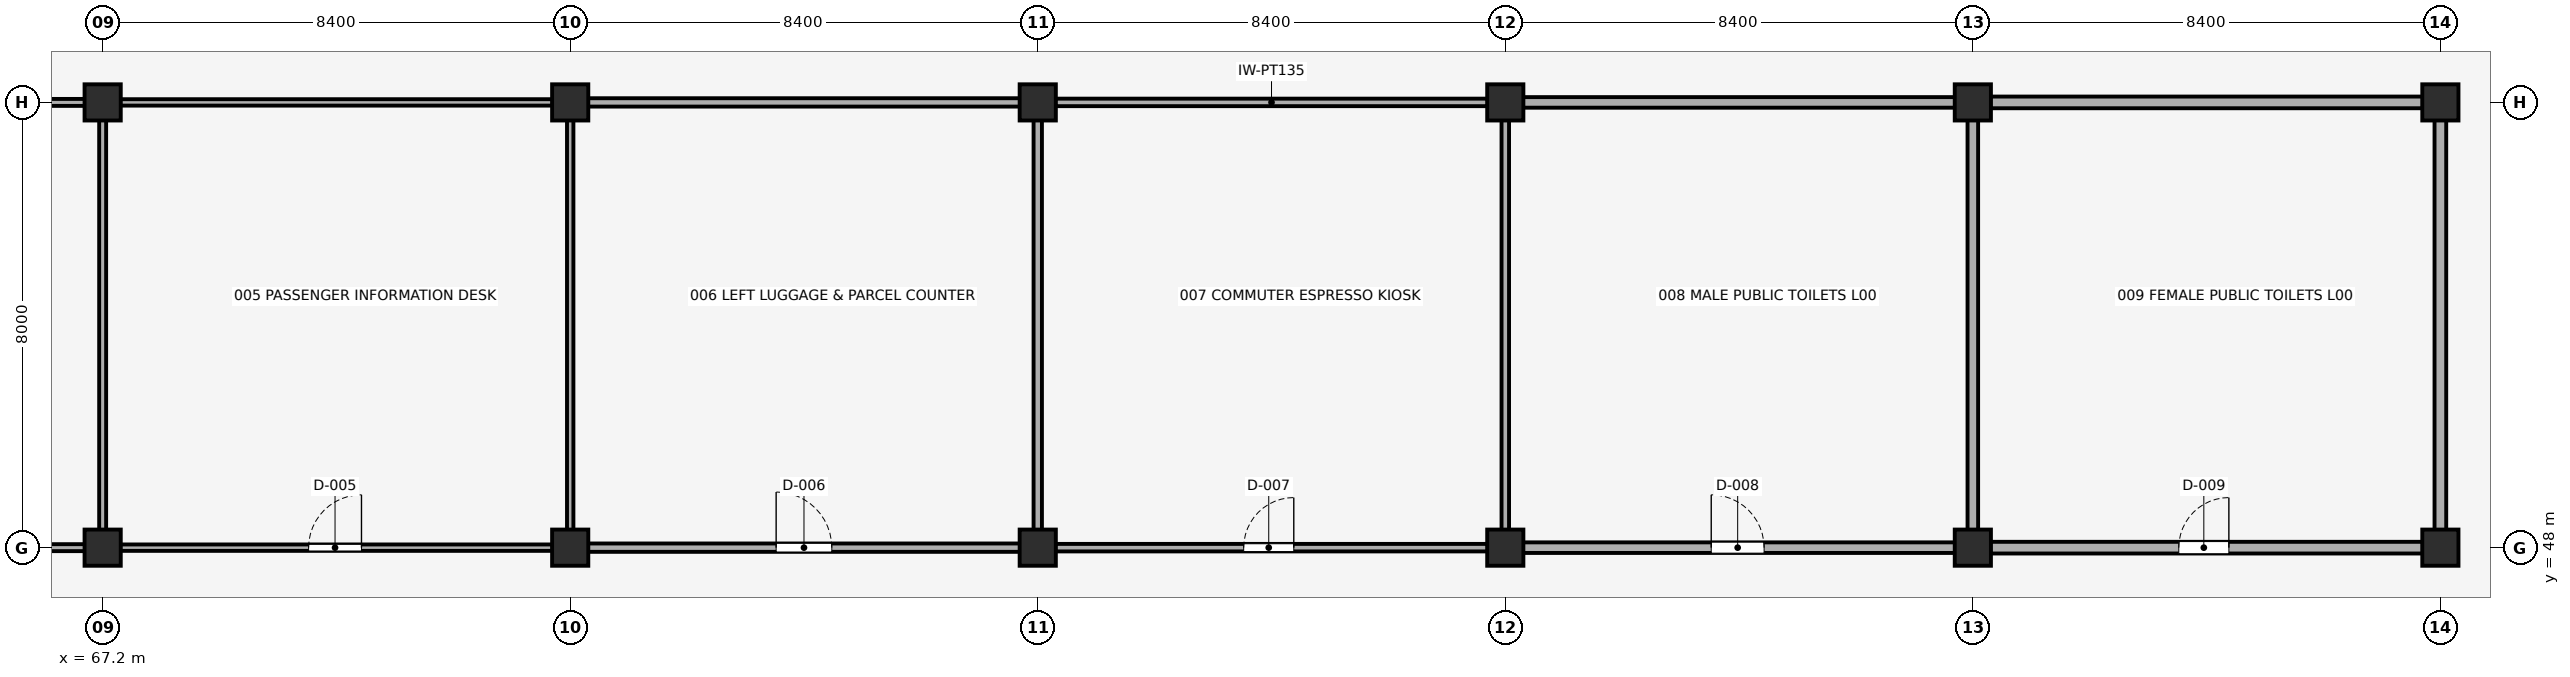
"""IFC4 building model, lengths in metres.
Left out: names, types, materials, properties, quantities, classifications, styles, units other than length and angle.
Written with IfcOpenShell. Run it as: python <this file> out.ifc"""

import sys

from ifc_helpers import new_model, si_unit, direction, frame, frame_2d, origin, origin_2d, place, context, subcontext, project, spatial, rectangle, circle, extrude, element, fill, save


model = new_model("IFC4")
c1 = context("Model", 3, precision=1e-05, world=origin(), true_north=direction((0.0, 1.0)))
c2 = subcontext(c1, "Body", "Model", "MODEL_VIEW")
j1 = project(units=[si_unit("LENGTHUNIT", "METRE"), si_unit("PLANEANGLEUNIT", "RADIAN")], contexts=[c1])
p1 = place(None, origin())
s1 = spatial("IfcSite", under=j1, at=p1, CompositionType="ELEMENT")
p2 = place(p1, origin())
s2 = spatial("IfcBuilding", under=s1, at=p2, CompositionType="ELEMENT")
p3 = place(p2, origin())
s3 = spatial("IfcBuildingStorey", under=s2, at=p3, CompositionType="ELEMENT", Elevation=0.0)
for number, where, z_axis, x_axis in (
    (1, (67.2, 48.0, 0.0), (0.0, 0.0, 1.0), (1.0, 0.0, 0.0)),
    (2, (67.2, 56.0, 0.0), (0.0, 0.0, 1.0), (1.0, 0.0, 0.0)),
    (3, (75.6, 48.0, 0.0), (0.0, 0.0, 1.0), (1.0, 0.0, 0.0)),
    (4, (75.6, 56.0, 0.0), (0.0, 0.0, 1.0), (1.0, 0.0, 0.0)),
    (5, (84.0, 48.0, 0.0), (0.0, 0.0, 1.0), (1.0, 0.0, 0.0)),
    (6, (84.0, 56.0, 0.0), (0.0, 0.0, 1.0), (1.0, 0.0, 0.0)),
    (7, (92.4, 48.0, 0.0), (0.0, 0.0, 1.0), (1.0, 0.0, 0.0)),
    (8, (92.4, 56.0, 0.0), (0.0, 0.0, 1.0), (1.0, 0.0, 0.0)),
    (9, (100.8, 48.0, 0.0), (0.0, 0.0, 1.0), (1.0, 0.0, 0.0)),
    (10, (100.8, 56.0, 0.0), (0.0, 0.0, 1.0), (1.0, 0.0, 0.0)),
    (11, (109.2, 48.0, 0.0), (0.0, 0.0, 1.0), (1.0, 0.0, 0.0)),
    (12, (109.2, 56.0, 0.0), (0.0, 0.0, 1.0), (1.0, 0.0, 0.0)),
):
    element("IfcColumn", number, at=place(p3, frame(where, z_axis=z_axis, x_axis=x_axis)), inside=s3, PredefinedType="COLUMN", context=c2, shape_type="SweptSolid", body=[
        extrude(circle(Radius=0.325, at=origin_2d()), origin(), (0.0, 0.0, 1.0), 5.15),
    ])
p4 = place(p3, frame((67.515, 48.0, 0.0), z_axis=(0.0, 0.0, 1.0), x_axis=(1.0, 0.0, 0.0)))
e13 = element("IfcWall", 13, at=p4, inside=s3, PredefinedType="PARTITIONING", context=c2, shape_type="SweptSolid", body=[
    extrude(rectangle(XDim=7.77, YDim=0.115, at=frame_2d((3.885, 0.0))), origin(), (0.0, 0.0, 1.0), 4.605),
])
p5 = place(p4, frame((3.385, 0.0, 0.0), z_axis=(0.0, 0.0, 1.0), x_axis=(1.0, 0.0, 0.0)))
e14 = element("IfcOpeningElement", 14, at=p5, cuts=e13, PredefinedType="OPENING", context=c2, shape_type="SweptSolid", body=[
    extrude(rectangle(XDim=0.95, YDim=2.15, at=frame_2d((0.475, 1.075))), frame((0.0, 0.067, 0.0), z_axis=(0.0, -1.0, 0.0), x_axis=(1.0, 0.0, 0.0)), (0.0, 0.0, 1.0), 0.135),
])
p6 = place(p3, frame((75.915, 48.0, 0.0), z_axis=(0.0, 0.0, 1.0), x_axis=(1.0, 0.0, 0.0)))
e15 = element("IfcWall", 15, at=p6, inside=s3, PredefinedType="PARTITIONING", context=c2, shape_type="SweptSolid", body=[
    extrude(rectangle(XDim=7.77, YDim=0.15, at=frame_2d((3.885, 0.0))), origin(), (0.0, 0.0, 1.0), 4.605),
])
p7 = place(p6, frame((3.385, 0.0, 0.0), z_axis=(0.0, 0.0, 1.0), x_axis=(1.0, 0.0, 0.0)))
e16 = element("IfcOpeningElement", 16, at=p7, cuts=e15, PredefinedType="OPENING", context=c2, shape_type="SweptSolid", body=[
    extrude(rectangle(XDim=1.0, YDim=2.15, at=frame_2d((0.5, 1.075))), frame((0.0, 0.085, 0.0), z_axis=(0.0, -1.0, 0.0), x_axis=(1.0, 0.0, 0.0)), (0.0, 0.0, 1.0), 0.17),
])
p8 = place(p3, frame((84.315, 48.0, 0.0), z_axis=(0.0, 0.0, 1.0), x_axis=(1.0, 0.0, 0.0)))
e17 = element("IfcWall", 17, at=p8, inside=s3, PredefinedType="PARTITIONING", context=c2, shape_type="SweptSolid", body=[
    extrude(rectangle(XDim=7.77, YDim=0.135, at=frame_2d((3.885, 0.0))), origin(), (0.0, 0.0, 1.0), 4.605),
])
p9 = place(p8, frame((3.385, 0.0, 0.0), z_axis=(0.0, 0.0, 1.0), x_axis=(1.0, 0.0, 0.0)))
e18 = element("IfcOpeningElement", 18, at=p9, cuts=e17, PredefinedType="OPENING", context=c2, shape_type="SweptSolid", body=[
    extrude(rectangle(XDim=0.9, YDim=2.1, at=frame_2d((0.45, 1.05))), frame((0.0, 0.077, 0.0), z_axis=(0.0, -1.0, 0.0), x_axis=(1.0, 0.0, 0.0)), (0.0, 0.0, 1.0), 0.155),
])
p10 = place(p3, frame((92.715, 48.0, 0.0), z_axis=(0.0, 0.0, 1.0), x_axis=(1.0, 0.0, 0.0)))
e19 = element("IfcWall", 19, at=p10, inside=s3, PredefinedType="PLUMBINGWALL", context=c2, shape_type="SweptSolid", body=[
    extrude(rectangle(XDim=7.77, YDim=0.19, at=frame_2d((3.885, 0.0))), origin(), (0.0, 0.0, 1.0), 4.605),
])
p11 = place(p10, frame((3.385, 0.0, 0.0), z_axis=(0.0, 0.0, 1.0), x_axis=(1.0, 0.0, 0.0)))
e20 = element("IfcOpeningElement", 20, at=p11, cuts=e19, PredefinedType="OPENING", context=c2, shape_type="SweptSolid", body=[
    extrude(rectangle(XDim=0.95, YDim=2.15, at=frame_2d((0.475, 1.075))), frame((0.0, 0.105, 0.0), z_axis=(0.0, -1.0, 0.0), x_axis=(1.0, 0.0, 0.0)), (0.0, 0.0, 1.0), 0.21),
])
p12 = place(p3, frame((101.115, 48.0, 0.0), z_axis=(0.0, 0.0, 1.0), x_axis=(1.0, 0.0, 0.0)))
e21 = element("IfcWall", 21, at=p12, inside=s3, PredefinedType="PLUMBINGWALL", context=c2, shape_type="SweptSolid", body=[
    extrude(rectangle(XDim=7.77, YDim=0.21, at=frame_2d((3.885, 0.0))), origin(), (0.0, 0.0, 1.0), 4.605),
])
p13 = place(p12, frame((3.385, 0.0, 0.0), z_axis=(0.0, 0.0, 1.0), x_axis=(1.0, 0.0, 0.0)))
e22 = element("IfcOpeningElement", 22, at=p13, cuts=e21, PredefinedType="OPENING", context=c2, shape_type="SweptSolid", body=[
    extrude(rectangle(XDim=0.9, YDim=2.15, at=frame_2d((0.45, 1.075))), frame((0.0, 0.115, 0.0), z_axis=(0.0, -1.0, 0.0), x_axis=(1.0, 0.0, 0.0)), (0.0, 0.0, 1.0), 0.23),
])
for number, where, z_axis, x_axis in (
    (23, (59.115, 48.0, 0.0), (0.0, 0.0, 1.0), (1.0, 0.0, 0.0)),
    (24, (59.115, 56.0, 0.0), (0.0, 0.0, 1.0), (1.0, 0.0, 0.0)),
):
    element("IfcWall", number, at=place(p3, frame(where, z_axis=z_axis, x_axis=x_axis)), inside=s3, PredefinedType="PARTITIONING", context=c2, shape_type="SweptSolid", body=[
        extrude(rectangle(XDim=7.77, YDim=0.125, at=frame_2d((3.885, 0.0))), origin(), (0.0, 0.0, 1.0), 4.605),
    ])
p14 = place(p3, frame((67.2, 48.315, 0.0), z_axis=(0.0, 0.0, 1.0), x_axis=(0.0, 1.0, 0.0)))
e25 = element("IfcWall", 25, at=p14, inside=s3, PredefinedType="PARTITIONING", context=c2, shape_type="SweptSolid", body=[
    extrude(rectangle(XDim=7.37, YDim=0.125, at=frame_2d((3.685, 0.0))), origin(), (0.0, 0.0, 1.0), 4.542),
])
p15 = place(p3, frame((67.515, 56.0, 0.0), z_axis=(0.0, 0.0, 1.0), x_axis=(1.0, 0.0, 0.0)))
e26 = element("IfcWall", 26, at=p15, inside=s3, PredefinedType="PARTITIONING", context=c2, shape_type="SweptSolid", body=[
    extrude(rectangle(XDim=7.77, YDim=0.115, at=frame_2d((3.885, 0.0))), origin(), (0.0, 0.0, 1.0), 4.605),
])
p16 = place(p3, frame((75.6, 48.315, 0.0), z_axis=(0.0, 0.0, 1.0), x_axis=(0.0, 1.0, 0.0)))
e27 = element("IfcWall", 27, at=p16, inside=s3, PredefinedType="PARTITIONING", context=c2, shape_type="SweptSolid", body=[
    extrude(rectangle(XDim=7.37, YDim=0.115, at=frame_2d((3.685, 0.0))), origin(), (0.0, 0.0, 1.0), 4.542),
])
p17 = place(p3, frame((75.915, 56.0, 0.0), z_axis=(0.0, 0.0, 1.0), x_axis=(1.0, 0.0, 0.0)))
e28 = element("IfcWall", 28, at=p17, inside=s3, PredefinedType="PARTITIONING", context=c2, shape_type="SweptSolid", body=[
    extrude(rectangle(XDim=7.77, YDim=0.15, at=frame_2d((3.885, 0.0))), origin(), (0.0, 0.0, 1.0), 4.605),
])
p18 = place(p3, frame((84.0, 48.315, 0.0), z_axis=(0.0, 0.0, 1.0), x_axis=(0.0, 1.0, 0.0)))
e29 = element("IfcWall", 29, at=p18, inside=s3, PredefinedType="PARTITIONING", context=c2, shape_type="SweptSolid", body=[
    extrude(rectangle(XDim=7.37, YDim=0.15, at=frame_2d((3.685, 0.0))), origin(), (0.0, 0.0, 1.0), 4.542),
])
p19 = place(p3, frame((84.315, 56.0, 0.0), z_axis=(0.0, 0.0, 1.0), x_axis=(1.0, 0.0, 0.0)))
e30 = element("IfcWall", 30, at=p19, inside=s3, PredefinedType="PARTITIONING", context=c2, shape_type="SweptSolid", body=[
    extrude(rectangle(XDim=7.77, YDim=0.135, at=frame_2d((3.885, 0.0))), origin(), (0.0, 0.0, 1.0), 4.605),
])
p20 = place(p3, frame((92.4, 48.315, 0.0), z_axis=(0.0, 0.0, 1.0), x_axis=(0.0, 1.0, 0.0)))
e31 = element("IfcWall", 31, at=p20, inside=s3, PredefinedType="PARTITIONING", context=c2, shape_type="SweptSolid", body=[
    extrude(rectangle(XDim=7.37, YDim=0.135, at=frame_2d((3.685, 0.0))), origin(), (0.0, 0.0, 1.0), 4.542),
])
p21 = place(p3, frame((92.715, 56.0, 0.0), z_axis=(0.0, 0.0, 1.0), x_axis=(1.0, 0.0, 0.0)))
e32 = element("IfcWall", 32, at=p21, inside=s3, PredefinedType="PLUMBINGWALL", context=c2, shape_type="SweptSolid", body=[
    extrude(rectangle(XDim=7.77, YDim=0.19, at=frame_2d((3.885, 0.0))), origin(), (0.0, 0.0, 1.0), 4.605),
])
p22 = place(p3, frame((100.8, 48.315, 0.0), z_axis=(0.0, 0.0, 1.0), x_axis=(0.0, 1.0, 0.0)))
e33 = element("IfcWall", 33, at=p22, inside=s3, PredefinedType="PLUMBINGWALL", context=c2, shape_type="SweptSolid", body=[
    extrude(rectangle(XDim=7.37, YDim=0.19, at=frame_2d((3.685, 0.0))), origin(), (0.0, 0.0, 1.0), 4.542),
])
p23 = place(p3, frame((101.115, 56.0, 0.0), z_axis=(0.0, 0.0, 1.0), x_axis=(1.0, 0.0, 0.0)))
e34 = element("IfcWall", 34, at=p23, inside=s3, PredefinedType="PLUMBINGWALL", context=c2, shape_type="SweptSolid", body=[
    extrude(rectangle(XDim=7.77, YDim=0.21, at=frame_2d((3.885, 0.0))), origin(), (0.0, 0.0, 1.0), 4.605),
])
p24 = place(p3, frame((109.2, 48.315, 0.0), z_axis=(0.0, 0.0, 1.0), x_axis=(0.0, 1.0, 0.0)))
e35 = element("IfcWall", 35, at=p24, inside=s3, PredefinedType="PLUMBINGWALL", context=c2, shape_type="SweptSolid", body=[
    extrude(rectangle(XDim=7.37, YDim=0.21, at=frame_2d((3.685, 0.0))), origin(), (0.0, 0.0, 1.0), 4.542),
])
p25 = place(p5, origin())
e36 = element("IfcDoor", 36, at=p25, inside=s3, OperationType="SINGLE_SWING_RIGHT", PredefinedType="DOOR", context=c2, shape_type="SweptSolid", body=[
    extrude(rectangle(XDim=0.95, YDim=2.15, at=frame_2d((0.475, 1.075))), frame((0.0, 0.025, 0.0), z_axis=(0.0, -1.0, 0.0), x_axis=(1.0, 0.0, 0.0)), (0.0, 0.0, 1.0), 0.05),
])
fill(e14, e36)
p26 = place(p7, origin())
e37 = element("IfcDoor", 37, at=p26, inside=s3, OperationType="SINGLE_SWING_LEFT", PredefinedType="DOOR", context=c2, shape_type="SweptSolid", body=[
    extrude(rectangle(XDim=1.0, YDim=2.15, at=frame_2d((0.5, 1.075))), frame((0.0, 0.025, 0.0), z_axis=(0.0, -1.0, 0.0), x_axis=(1.0, 0.0, 0.0)), (0.0, 0.0, 1.0), 0.05),
])
fill(e16, e37)
p27 = place(p9, origin())
e38 = element("IfcDoor", 38, at=p27, inside=s3, OperationType="SINGLE_SWING_RIGHT", PredefinedType="DOOR", context=c2, shape_type="SweptSolid", body=[
    extrude(rectangle(XDim=0.9, YDim=2.1, at=frame_2d((0.45, 1.05))), frame((0.0, 0.025, 0.0), z_axis=(0.0, -1.0, 0.0), x_axis=(1.0, 0.0, 0.0)), (0.0, 0.0, 1.0), 0.05),
])
fill(e18, e38)
p28 = place(p11, origin())
e39 = element("IfcDoor", 39, at=p28, inside=s3, OperationType="SINGLE_SWING_LEFT", PredefinedType="DOOR", context=c2, shape_type="SweptSolid", body=[
    extrude(rectangle(XDim=0.95, YDim=2.15, at=frame_2d((0.475, 1.075))), frame((0.0, 0.025, 0.0), z_axis=(0.0, -1.0, 0.0), x_axis=(1.0, 0.0, 0.0)), (0.0, 0.0, 1.0), 0.05),
])
fill(e20, e39)
p29 = place(p13, origin())
e40 = element("IfcDoor", 40, at=p29, inside=s3, OperationType="SINGLE_SWING_RIGHT", PredefinedType="DOOR", context=c2, shape_type="SweptSolid", body=[
    extrude(rectangle(XDim=0.9, YDim=2.15, at=frame_2d((0.45, 1.075))), frame((0.0, 0.025, 0.0), z_axis=(0.0, -1.0, 0.0), x_axis=(1.0, 0.0, 0.0)), (0.0, 0.0, 1.0), 0.05),
])
fill(e22, e40)
save(model, sys.argv[1])
